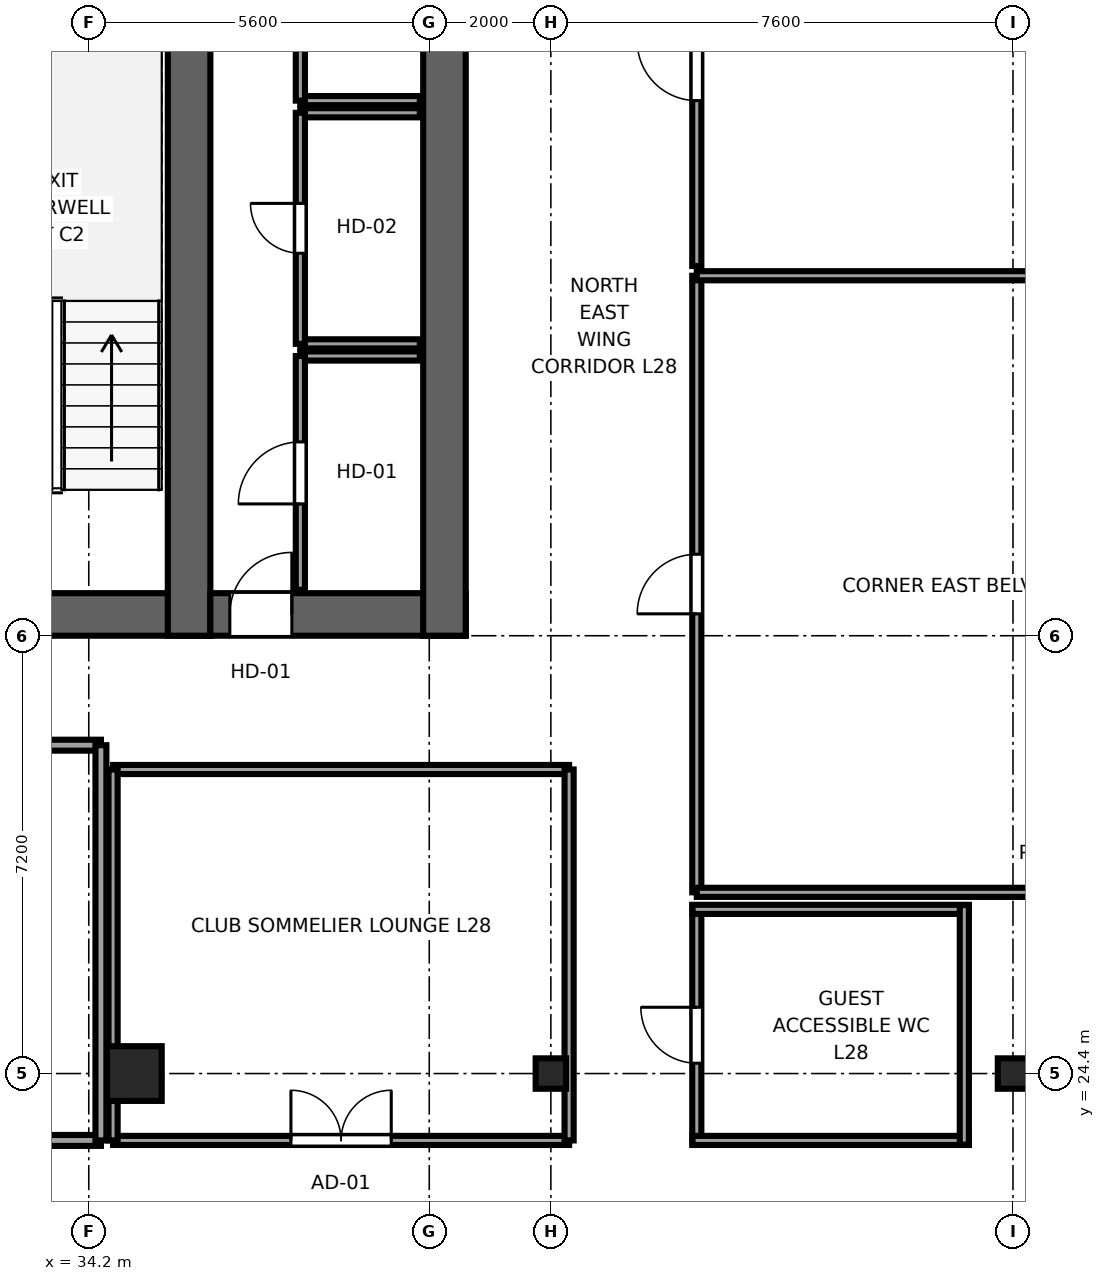
"""IFC4 building model, lengths in metres.
Left out: names, types, materials, properties, quantities, classifications, styles, units other than length and angle.
Written with IfcOpenShell. Run it as: python <this file> out.ifc"""

import sys

from ifc_helpers import new_model, si_unit, direction, frame, frame_2d, origin, origin_2d, place, context, subcontext, project, spatial, rectangle, i_section, extrude, source, transform, mapped, element, fill, save


model = new_model("IFC4")
c1 = context("Model", 3, precision=1e-05, world=origin(), true_north=direction((0.0, 1.0)))
c2 = subcontext(c1, "Body", "Model", "MODEL_VIEW")
j1 = project(units=[si_unit("LENGTHUNIT", "METRE"), si_unit("PLANEANGLEUNIT", "RADIAN")], contexts=[c1])
p1 = place(None, origin())
s1 = spatial("IfcSite", under=j1, at=p1, CompositionType="ELEMENT")
p2 = place(p1, origin())
s2 = spatial("IfcBuilding", under=s1, at=p2, CompositionType="ELEMENT")
p3 = place(p2, frame((0.0, 0.0, 111.55)))
s3 = spatial("IfcBuildingStorey", under=s2, at=p3, CompositionType="ELEMENT", Elevation=111.55)
p4 = place(p3, frame((9.8, 31.95, 0.0), z_axis=(0.0, 0.0, 1.0), x_axis=(1.0, 0.0, 0.0)))
e1 = element("IfcWall", 1, at=p4, inside=s3, PredefinedType="SHEAR", context=c2, shape_type="SweptSolid", body=[
    extrude(rectangle(XDim=26.4, YDim=0.7, at=frame_2d((13.2, 0.0))), origin(), (0.0, 0.0, 1.0), 3.55),
])
p5 = place(p4, frame((6.32, 0.0, 0.0), z_axis=(0.0, 0.0, 1.0), x_axis=(-1.0, 0.0, 0.0)))
e2 = element("IfcOpeningElement", 2, at=p5, cuts=e1, PredefinedType="OPENING", context=c2, shape_type="SweptSolid", body=[
    extrude(rectangle(XDim=1.5, YDim=2.04, at=frame_2d((0.75, 1.02))), frame((0.0, 0.36, 0.0), z_axis=(0.0, -1.0, 0.0), x_axis=(1.0, 0.0, 0.0)), (0.0, 0.0, 1.0), 0.72),
])
p6 = place(p4, frame((13.95, 0.0, 0.0), z_axis=(0.0, 0.0, 1.0), x_axis=(-1.0, 0.0, 0.0)))
e3 = element("IfcOpeningElement", 3, at=p6, cuts=e1, PredefinedType="OPENING", context=c2, shape_type="SweptSolid", body=[
    extrude(rectangle(XDim=1.5, YDim=2.04, at=frame_2d((0.75, 1.02))), frame((0.0, 0.36, 0.0), z_axis=(0.0, -1.0, 0.0), x_axis=(1.0, 0.0, 0.0)), (0.0, 0.0, 1.0), 0.72),
])
p7 = place(p4, frame((20.25, 0.0, 0.0), z_axis=(0.0, 0.0, 1.0), x_axis=(-1.0, 0.0, 0.0)))
e4 = element("IfcOpeningElement", 4, at=p7, cuts=e1, PredefinedType="OPENING", context=c2, shape_type="SweptSolid", body=[
    extrude(rectangle(XDim=1.5, YDim=2.04, at=frame_2d((0.75, 1.02))), frame((0.0, 0.36, 0.0), z_axis=(0.0, -1.0, 0.0), x_axis=(1.0, 0.0, 0.0)), (0.0, 0.0, 1.0), 0.72),
])
p8 = place(p4, frame((8.37, 0.0, 0.0), z_axis=(0.0, 0.0, 1.0), x_axis=(-1.0, 0.0, 0.0)))
e5 = element("IfcOpeningElement", 5, at=p8, cuts=e1, PredefinedType="OPENING", context=c2, shape_type="SweptSolid", body=[
    extrude(rectangle(XDim=0.82, YDim=2.01, at=frame_2d((0.41, 1.005))), frame((0.0, 0.36, 0.0), z_axis=(0.0, -1.0, 0.0), x_axis=(1.0, 0.0, 0.0)), (0.0, 0.0, 1.0), 0.72),
])
p9 = place(p3, frame((35.85, 31.6, 0.0), z_axis=(0.0, 0.0, 1.0), x_axis=(0.0, 1.0, 0.0)))
e6 = element("IfcWall", 6, at=p9, inside=s3, PredefinedType="SHEAR", context=c2, shape_type="SweptSolid", body=[
    extrude(rectangle(XDim=13.6, YDim=0.7, at=frame_2d((6.8, 0.0))), origin(), (0.0, 0.0, 1.0), 3.55),
])
p10 = place(p3, frame((36.2, 31.95, 0.0), z_axis=(0.0, 0.0, 1.0), x_axis=(1.0, 0.0, 0.0)))
e7 = element("IfcWall", 7, at=p10, inside=s3, PredefinedType="SHEAR", context=c2, shape_type="SweptSolid", body=[
    extrude(rectangle(XDim=4.2, YDim=0.7, at=frame_2d((2.1, 0.0))), origin(), (0.0, 0.0, 1.0), 3.55),
])
p11 = place(p10, frame((1.34, 0.0, 0.0), z_axis=(0.0, 0.0, 1.0), x_axis=(-1.0, 0.0, 0.0)))
e8 = element("IfcOpeningElement", 8, at=p11, cuts=e7, PredefinedType="OPENING", context=c2, shape_type="SweptSolid", body=[
    extrude(rectangle(XDim=1.02, YDim=2.03, at=frame_2d((0.51, 1.015))), frame((0.0, 0.36, 0.0), z_axis=(0.0, -1.0, 0.0), x_axis=(1.0, 0.0, 0.0)), (0.0, 0.0, 1.0), 0.72),
])
p12 = place(p3, frame((40.05, 31.6, 0.0), z_axis=(0.0, 0.0, 1.0), x_axis=(0.0, 1.0, 0.0)))
e9 = element("IfcWall", 9, at=p12, inside=s3, PredefinedType="SHEAR", context=c2, shape_type="SweptSolid", body=[
    extrude(rectangle(XDim=13.6, YDim=0.7, at=frame_2d((6.8, 0.0))), origin(), (0.0, 0.0, 1.0), 3.55),
])
m1 = source(origin(), c2, "Body", "SweptSolid", [
    extrude(rectangle(XDim=0.9, YDim=0.9, at=origin_2d()), origin(), (0.0, 0.0, 1.0), 3.55),
])
p13 = place(p3, frame((34.95, 24.4, 0.0), z_axis=(0.0, 0.0, 1.0), x_axis=(1.0, 0.0, 0.0)))
e10 = element("IfcColumn", 10, at=p13, inside=s3, PredefinedType="COLUMN", context=c2, shape_type="MappedRepresentation", body=[
    mapped(m1, transform((0.0, 0.0, 0.0), x_axis=(1.0, 0.0, 0.0), y_axis=(0.0, 1.0, 0.0), z_axis=(0.0, 0.0, 1.0), scale=1.0)),
])
m2 = source(origin(), c2, "Body", "SweptSolid", [
    extrude(i_section(OverallWidth=0.5, OverallDepth=0.5, WebThickness=0.022, FlangeThickness=0.034, at=origin_2d()), origin(), (0.0, 0.0, 1.0), 3.55),
])
for number, where, z_axis, x_axis in (
    (11, (41.8, 24.4, 0.0), (0.0, 0.0, 1.0), (1.0, 0.0, 0.0)),
    (12, (49.4, 24.4, 0.0), (0.0, 0.0, 1.0), (1.0, 0.0, 0.0)),
):
    element("IfcColumn", number, at=place(p3, frame(where, z_axis=z_axis, x_axis=x_axis)), inside=s3, PredefinedType="COLUMN", context=c2, shape_type="MappedRepresentation", body=[
        mapped(m2, transform((0.0, 0.0, 0.0), x_axis=(1.0, 0.0, 0.0), y_axis=(0.0, 1.0, 0.0), z_axis=(0.0, 0.0, 1.0), scale=1.0)),
    ])
p14 = place(p3, frame((37.68, 36.2, 0.0), z_axis=(0.0, 0.0, 1.0), x_axis=(1.0, 0.0, 0.0)))
e13 = element("IfcWall", 13, at=p14, inside=s3, PredefinedType="PARTITIONING", context=c2, shape_type="SweptSolid", body=[
    extrude(rectangle(XDim=1.965, YDim=0.15, at=frame_2d((0.982, 0.0))), origin(), (0.0, 0.0, 1.0), 3.37),
])
p15 = place(p3, frame((37.68, 32.355, 0.0), z_axis=(0.0, 0.0, 1.0), x_axis=(0.0, 1.0, 0.0)))
e14 = element("IfcWall", 14, at=p15, inside=s3, PredefinedType="PARTITIONING", context=c2, shape_type="SweptSolid", body=[
    extrude(rectangle(XDim=3.845, YDim=0.15, at=frame_2d((1.922, 0.0))), origin(), (0.0, 0.0, 1.0), 3.37),
])
p16 = place(p15, frame((1.413, 0.0, 0.0)))
e15 = element("IfcOpeningElement", 15, at=p16, cuts=e14, PredefinedType="OPENING", context=c2, shape_type="SweptSolid", body=[
    extrude(rectangle(XDim=1.02, YDim=2.03, at=frame_2d((0.51, 1.015))), frame((0.0, 0.085, 0.0), z_axis=(0.0, -1.0, 0.0), x_axis=(1.0, 0.0, 0.0)), (0.0, 0.0, 1.0), 0.17),
])
for number, where, z_axis, x_axis in (
    (16, (37.68, 36.4, 0.0), (0.0, 0.0, 1.0), (1.0, 0.0, 0.0)),
    (17, (37.68, 40.2, 0.0), (0.0, 0.0, 1.0), (1.0, 0.0, 0.0)),
):
    element("IfcWall", number, at=place(p3, frame(where, z_axis=z_axis, x_axis=x_axis)), inside=s3, PredefinedType="PARTITIONING", context=c2, shape_type="SweptSolid", body=[
        extrude(rectangle(XDim=1.965, YDim=0.15, at=frame_2d((0.982, 0.0))), origin(), (0.0, 0.0, 1.0), 3.37),
    ])
p17 = place(p3, frame((37.68, 36.4, 0.0), z_axis=(0.0, 0.0, 1.0), x_axis=(0.0, 1.0, 0.0)))
e18 = element("IfcWall", 18, at=p17, inside=s3, PredefinedType="PARTITIONING", context=c2, shape_type="SweptSolid", body=[
    extrude(rectangle(XDim=3.8, YDim=0.15, at=frame_2d((1.9, 0.0))), origin(), (0.0, 0.0, 1.0), 3.37),
])
p18 = place(p17, frame((1.49, 0.0, 0.0)))
e19 = element("IfcOpeningElement", 19, at=p18, cuts=e18, PredefinedType="OPENING", context=c2, shape_type="SweptSolid", body=[
    extrude(rectangle(XDim=0.82, YDim=2.01, at=frame_2d((0.41, 1.005))), frame((0.0, 0.085, 0.0), z_axis=(0.0, -1.0, 0.0), x_axis=(1.0, 0.0, 0.0)), (0.0, 0.0, 1.0), 0.17),
])
p19 = place(p3, frame((37.68, 40.4, 0.0), z_axis=(0.0, 0.0, 1.0), x_axis=(1.0, 0.0, 0.0)))
e20 = element("IfcWall", 20, at=p19, inside=s3, PredefinedType="PARTITIONING", context=c2, shape_type="SweptSolid", body=[
    extrude(rectangle(XDim=1.965, YDim=0.15, at=frame_2d((0.982, 0.0))), origin(), (0.0, 0.0, 1.0), 3.37),
])
p20 = place(p3, frame((37.68, 40.4, 0.0), z_axis=(0.0, 0.0, 1.0), x_axis=(0.0, 1.0, 0.0)))
e21 = element("IfcWall", 21, at=p20, inside=s3, PredefinedType="PARTITIONING", context=c2, shape_type="SweptSolid", body=[
    extrude(rectangle(XDim=3.8, YDim=0.15, at=frame_2d((1.9, 0.0))), origin(), (0.0, 0.0, 1.0), 3.37),
])
p21 = place(p20, frame((1.49, 0.0, 0.0)))
e22 = element("IfcOpeningElement", 22, at=p21, cuts=e21, PredefinedType="OPENING", context=c2, shape_type="SweptSolid", body=[
    extrude(rectangle(XDim=0.82, YDim=2.01, at=frame_2d((0.41, 1.005))), frame((0.0, 0.085, 0.0), z_axis=(0.0, -1.0, 0.0), x_axis=(1.0, 0.0, 0.0)), (0.0, 0.0, 1.0), 0.17),
])
p22 = place(p3, frame((44.2, 23.23, 0.0), z_axis=(0.0, 0.0, 1.0), x_axis=(0.0, 1.0, 0.0)))
e23 = element("IfcWall", 23, at=p22, inside=s3, PredefinedType="PARTITIONING", context=c2, shape_type="SweptSolid", body=[
    extrude(rectangle(XDim=3.94, YDim=0.15, at=frame_2d((1.97, 0.0))), origin(), (0.0, 0.0, 1.0), 3.37),
])
p23 = place(p22, frame((1.34, 0.0, 0.0)))
e24 = element("IfcOpeningElement", 24, at=p23, cuts=e23, PredefinedType="OPENING", context=c2, shape_type="SweptSolid", body=[
    extrude(rectangle(XDim=0.92, YDim=2.01, at=frame_2d((0.46, 1.005))), frame((0.0, 0.085, 0.0), z_axis=(0.0, -1.0, 0.0), x_axis=(1.0, 0.0, 0.0)), (0.0, 0.0, 1.0), 0.17),
])
for number, where, z_axis, x_axis in (
    (25, (44.13, 23.3, 0.0), (0.0, 0.0, 1.0), (1.0, 0.0, 0.0)),
    (26, (44.13, 27.1, 0.0), (0.0, 0.0, 1.0), (1.0, 0.0, 0.0)),
):
    element("IfcWall", number, at=place(p3, frame(where, z_axis=z_axis, x_axis=x_axis)), inside=s3, PredefinedType="PARTITIONING", context=c2, shape_type="SweptSolid", body=[
        extrude(rectangle(XDim=4.54, YDim=0.15, at=frame_2d((2.27, 0.0))), origin(), (0.0, 0.0, 1.0), 3.37),
    ])
p24 = place(p3, frame((48.6, 23.23, 0.0), z_axis=(0.0, 0.0, 1.0), x_axis=(0.0, 1.0, 0.0)))
e27 = element("IfcWall", 27, at=p24, inside=s3, PredefinedType="PARTITIONING", context=c2, shape_type="SweptSolid", body=[
    extrude(rectangle(XDim=3.94, YDim=0.15, at=frame_2d((1.97, 0.0))), origin(), (0.0, 0.0, 1.0), 3.37),
])
p25 = place(p3, frame((44.2, 27.38, 0.0), z_axis=(0.0, 0.0, 1.0), x_axis=(0.0, 1.0, 0.0)))
e28 = element("IfcWall", 28, at=p25, inside=s3, PredefinedType="PARTITIONING", context=c2, shape_type="SweptSolid", body=[
    extrude(rectangle(XDim=10.14, YDim=0.15, at=frame_2d((5.07, 0.0))), origin(), (0.0, 0.0, 1.0), 3.37),
])
p26 = place(p25, frame((4.58, 0.0, 0.0)))
e29 = element("IfcOpeningElement", 29, at=p26, cuts=e28, PredefinedType="OPENING", context=c2, shape_type="SweptSolid", body=[
    extrude(rectangle(XDim=0.98, YDim=2.12, at=frame_2d((0.49, 1.06))), frame((0.0, 0.085, 0.0), z_axis=(0.0, -1.0, 0.0), x_axis=(1.0, 0.0, 0.0)), (0.0, 0.0, 1.0), 0.17),
])
p27 = place(p3, frame((44.2, 27.38, 0.0), z_axis=(0.0, 0.0, 1.0), x_axis=(1.0, 0.0, 0.0)))
e30 = element("IfcWall", 30, at=p27, inside=s3, PredefinedType="PARTITIONING", context=c2, shape_type="SweptSolid", body=[
    extrude(rectangle(XDim=12.395, YDim=0.15, at=frame_2d((6.198, 0.0))), origin(), (0.0, 0.0, 1.0), 3.37),
])
p28 = place(p3, frame((44.2, 37.52, 0.0), z_axis=(0.0, 0.0, 1.0), x_axis=(1.0, 0.0, 0.0)))
e31 = element("IfcWall", 31, at=p28, inside=s3, PredefinedType="PARTITIONING", context=c2, shape_type="SweptSolid", body=[
    extrude(rectangle(XDim=10.03, YDim=0.15, at=frame_2d((5.015, 0.0))), origin(), (0.0, 0.0, 1.0), 3.37),
])
p29 = place(p3, frame((44.2, 37.68, 0.0), z_axis=(0.0, 0.0, 1.0), x_axis=(0.0, 1.0, 0.0)))
e32 = element("IfcWall", 32, at=p29, inside=s3, PredefinedType="PARTITIONING", context=c2, shape_type="SweptSolid", body=[
    extrude(rectangle(XDim=6.53, YDim=0.15, at=frame_2d((3.265, 0.0))), origin(), (0.0, 0.0, 1.0), 3.37),
])
p30 = place(p29, frame((2.72, 0.0, 0.0)))
e33 = element("IfcOpeningElement", 33, at=p30, cuts=e32, PredefinedType="OPENING", context=c2, shape_type="SweptSolid", body=[
    extrude(rectangle(XDim=0.98, YDim=2.12, at=frame_2d((0.49, 1.06))), frame((0.0, 0.085, 0.0), z_axis=(0.0, -1.0, 0.0), x_axis=(1.0, 0.0, 0.0)), (0.0, 0.0, 1.0), 0.17),
])
p31 = place(p3, frame((27.1, 23.3, 0.0), z_axis=(0.0, 0.0, 1.0), x_axis=(1.0, 0.0, 0.0)))
e34 = element("IfcWall", 34, at=p31, inside=s3, PredefinedType="PARTITIONING", context=c2, shape_type="SweptSolid", body=[
    extrude(rectangle(XDim=7.3, YDim=0.18, at=frame_2d((3.65, 0.0))), origin(), (0.0, 0.0, 1.0), 3.37),
])
p32 = place(p31, frame((2.825, 0.0, 0.0)))
e35 = element("IfcOpeningElement", 35, at=p32, cuts=e34, PredefinedType="OPENING", context=c2, shape_type="SweptSolid", body=[
    extrude(rectangle(XDim=1.65, YDim=2.15, at=frame_2d((0.825, 1.075))), frame((0.0, 0.1, 0.0), z_axis=(0.0, -1.0, 0.0), x_axis=(1.0, 0.0, 0.0)), (0.0, 0.0, 1.0), 0.2),
])
p33 = place(p3, frame((27.1, 29.8, 0.0), z_axis=(0.0, 0.0, 1.0), x_axis=(1.0, 0.0, 0.0)))
e36 = element("IfcWall", 36, at=p33, inside=s3, PredefinedType="PARTITIONING", context=c2, shape_type="SweptSolid", body=[
    extrude(rectangle(XDim=7.3, YDim=0.18, at=frame_2d((3.65, 0.0))), origin(), (0.0, 0.0, 1.0), 3.37),
])
p34 = place(p3, frame((34.4, 23.3, 0.0), z_axis=(0.0, 0.0, 1.0), x_axis=(0.0, 1.0, 0.0)))
e37 = element("IfcWall", 37, at=p34, inside=s3, PredefinedType="PARTITIONING", context=c2, shape_type="SweptSolid", body=[
    extrude(rectangle(XDim=6.5, YDim=0.18, at=frame_2d((3.25, 0.0))), origin(), (0.0, 0.0, 1.0), 3.37),
])
p35 = place(p3, frame((34.6, 23.3, 0.0), z_axis=(0.0, 0.0, 1.0), x_axis=(1.0, 0.0, 0.0)))
e38 = element("IfcWall", 38, at=p35, inside=s3, PredefinedType="PARTITIONING", context=c2, shape_type="SweptSolid", body=[
    extrude(rectangle(XDim=7.5, YDim=0.15, at=frame_2d((3.75, 0.0))), origin(), (0.0, 0.0, 1.0), 3.37),
])
p36 = place(p35, frame((2.925, 0.0, 0.0)))
e39 = element("IfcOpeningElement", 39, at=p36, cuts=e38, PredefinedType="OPENING", context=c2, shape_type="SweptSolid", body=[
    extrude(rectangle(XDim=1.65, YDim=2.15, at=frame_2d((0.825, 1.075))), frame((0.0, 0.085, 0.0), z_axis=(0.0, -1.0, 0.0), x_axis=(1.0, 0.0, 0.0)), (0.0, 0.0, 1.0), 0.17),
])
p37 = place(p3, frame((34.6, 29.4, 0.0), z_axis=(0.0, 0.0, 1.0), x_axis=(1.0, 0.0, 0.0)))
e40 = element("IfcWall", 40, at=p37, inside=s3, PredefinedType="PARTITIONING", context=c2, shape_type="SweptSolid", body=[
    extrude(rectangle(XDim=7.5, YDim=0.15, at=frame_2d((3.75, 0.0))), origin(), (0.0, 0.0, 1.0), 3.37),
])
p38 = place(p3, frame((34.6, 23.3, 0.0), z_axis=(0.0, 0.0, 1.0), x_axis=(0.0, 1.0, 0.0)))
e41 = element("IfcWall", 41, at=p38, inside=s3, PredefinedType="PARTITIONING", context=c2, shape_type="SweptSolid", body=[
    extrude(rectangle(XDim=6.1, YDim=0.15, at=frame_2d((3.05, 0.0))), origin(), (0.0, 0.0, 1.0), 3.37),
])
p39 = place(p3, frame((42.1, 23.3, 0.0), z_axis=(0.0, 0.0, 1.0), x_axis=(0.0, 1.0, 0.0)))
e42 = element("IfcWall", 42, at=p39, inside=s3, PredefinedType="PARTITIONING", context=c2, shape_type="SweptSolid", body=[
    extrude(rectangle(XDim=6.1, YDim=0.15, at=frame_2d((3.05, 0.0))), origin(), (0.0, 0.0, 1.0), 2.16),
])
m3 = source(origin(), c2, "Body", "SweptSolid", [
    extrude(rectangle(XDim=1.02, YDim=2.03, at=frame_2d((0.51, 1.015))), frame((0.0, 0.025, 0.0), z_axis=(0.0, -1.0, 0.0), x_axis=(1.0, 0.0, 0.0)), (0.0, 0.0, 1.0), 0.05),
])
p40 = place(p11, origin())
e43 = element("IfcDoor", 43, at=p40, inside=s3, OperationType="SINGLE_SWING_RIGHT", PredefinedType="DOOR", context=c2, shape_type="MappedRepresentation", body=[
    mapped(m3, transform((0.0, 0.0, 0.0), x_axis=(1.0, 0.0, 0.0), y_axis=(0.0, 1.0, 0.0), z_axis=(0.0, 0.0, 1.0), scale=1.0)),
])
fill(e8, e43)
p41 = place(p16, origin())
e44 = element("IfcDoor", 44, at=p41, inside=s3, OperationType="SINGLE_SWING_LEFT", PredefinedType="DOOR", context=c2, shape_type="MappedRepresentation", body=[
    mapped(m3, transform((0.0, 0.0, 0.0), x_axis=(1.0, 0.0, 0.0), y_axis=(0.0, 1.0, 0.0), z_axis=(0.0, 0.0, 1.0), scale=1.0)),
])
fill(e15, e44)
m4 = source(origin(), c2, "Body", "SweptSolid", [
    extrude(rectangle(XDim=0.82, YDim=2.01, at=frame_2d((0.41, 1.005))), frame((0.0, 0.025, 0.0), z_axis=(0.0, -1.0, 0.0), x_axis=(1.0, 0.0, 0.0)), (0.0, 0.0, 1.0), 0.05),
])
p42 = place(p18, origin())
e45 = element("IfcDoor", 45, at=p42, inside=s3, OperationType="SINGLE_SWING_RIGHT", PredefinedType="DOOR", context=c2, shape_type="MappedRepresentation", body=[
    mapped(m4, transform((0.0, 0.0, 0.0), x_axis=(1.0, 0.0, 0.0), y_axis=(0.0, 1.0, 0.0), z_axis=(0.0, 0.0, 1.0), scale=1.0)),
])
fill(e19, e45)
m5 = source(origin(), c2, "Body", "SweptSolid", [
    extrude(rectangle(XDim=0.92, YDim=2.01, at=frame_2d((0.46, 1.005))), frame((0.0, 0.025, 0.0), z_axis=(0.0, -1.0, 0.0), x_axis=(1.0, 0.0, 0.0)), (0.0, 0.0, 1.0), 0.05),
])
p43 = place(p23, origin())
e46 = element("IfcDoor", 46, at=p43, inside=s3, OperationType="SINGLE_SWING_RIGHT", PredefinedType="DOOR", context=c2, shape_type="MappedRepresentation", body=[
    mapped(m5, transform((0.0, 0.0, 0.0), x_axis=(1.0, 0.0, 0.0), y_axis=(0.0, 1.0, 0.0), z_axis=(0.0, 0.0, 1.0), scale=1.0)),
])
fill(e24, e46)
m6 = source(origin(), c2, "Body", "SweptSolid", [
    extrude(rectangle(XDim=0.98, YDim=2.12, at=frame_2d((0.49, 1.06))), frame((0.0, 0.025, 0.0), z_axis=(0.0, -1.0, 0.0), x_axis=(1.0, 0.0, 0.0)), (0.0, 0.0, 1.0), 0.05),
])
p44 = place(p26, origin())
e47 = element("IfcDoor", 47, at=p44, inside=s3, OperationType="SINGLE_SWING_LEFT", PredefinedType="DOOR", context=c2, shape_type="MappedRepresentation", body=[
    mapped(m6, transform((0.0, 0.0, 0.0), x_axis=(1.0, 0.0, 0.0), y_axis=(0.0, 1.0, 0.0), z_axis=(0.0, 0.0, 1.0), scale=1.0)),
])
fill(e29, e47)
p45 = place(p30, origin())
e48 = element("IfcDoor", 48, at=p45, inside=s3, OperationType="SINGLE_SWING_RIGHT", PredefinedType="DOOR", context=c2, shape_type="MappedRepresentation", body=[
    mapped(m6, transform((0.0, 0.0, 0.0), x_axis=(1.0, 0.0, 0.0), y_axis=(0.0, 1.0, 0.0), z_axis=(0.0, 0.0, 1.0), scale=1.0)),
])
fill(e33, e48)
m7 = source(origin(), c2, "Body", "SweptSolid", [
    extrude(rectangle(XDim=1.65, YDim=2.15, at=frame_2d((0.825, 1.075))), frame((0.0, 0.025, 0.0), z_axis=(0.0, -1.0, 0.0), x_axis=(1.0, 0.0, 0.0)), (0.0, 0.0, 1.0), 0.05),
])
p46 = place(p36, origin())
e49 = element("IfcDoor", 49, at=p46, inside=s3, OperationType="DOUBLE_DOOR_SINGLE_SWING", PredefinedType="DOOR", context=c2, shape_type="MappedRepresentation", body=[
    mapped(m7, transform((0.0, 0.0, 0.0), x_axis=(1.0, 0.0, 0.0), y_axis=(0.0, 1.0, 0.0), z_axis=(0.0, 0.0, 1.0), scale=1.0)),
])
fill(e39, e49)
save(model, sys.argv[1])
